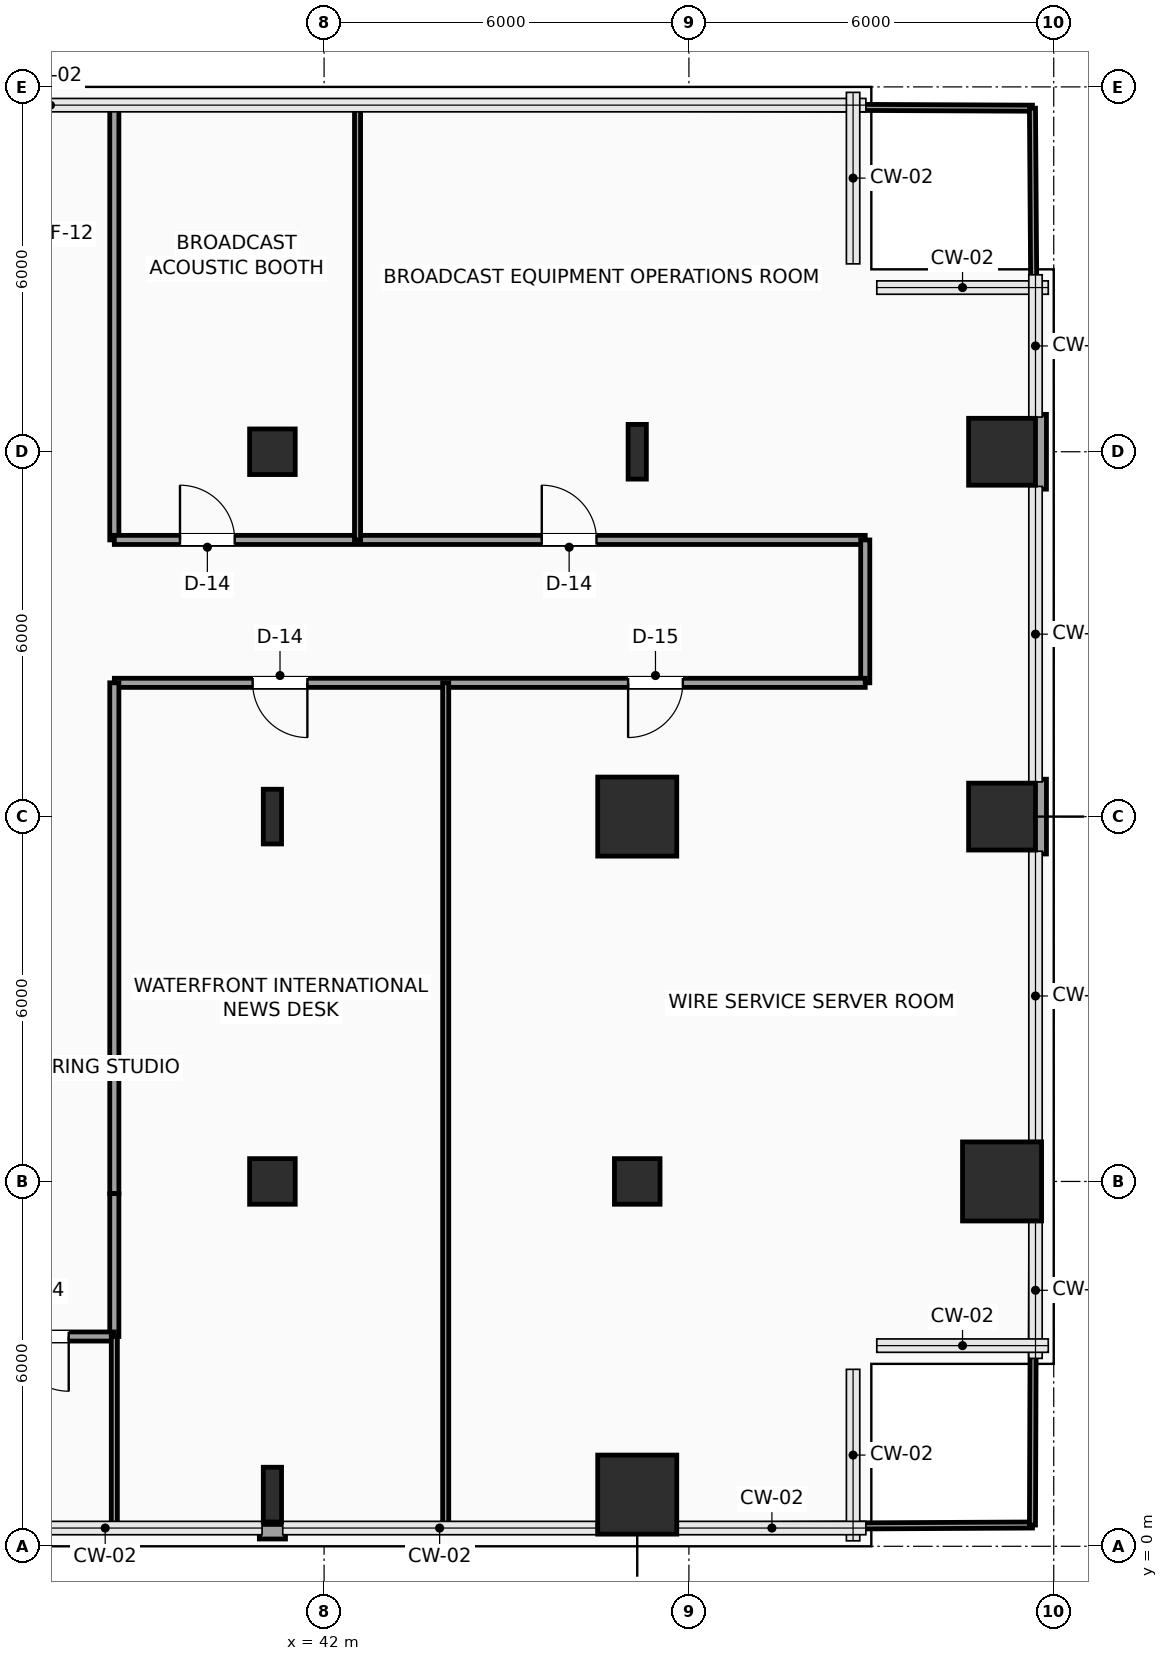
"""IFC4 building model, lengths in metres.
Left out: names, types, materials, properties, quantities, classifications, styles, units other than length and angle.
Written with IfcOpenShell. Run it as: python <this file> out.ifc"""

import sys

from ifc_helpers import new_model, si_unit, direction, frame, frame_2d, origin, origin_2d, place, context, subcontext, project, spatial, rectangle, hollow_rectangle, i_section, extrude, element, fill, save


model = new_model("IFC4")
c1 = context("Model", 3, precision=1e-05, world=origin(), true_north=direction((0.0, 1.0)))
c2 = subcontext(c1, "Body", "Model", "MODEL_VIEW")
j1 = project(units=[si_unit("LENGTHUNIT", "METRE"), si_unit("PLANEANGLEUNIT", "RADIAN")], contexts=[c1])
p1 = place(None, origin())
s1 = spatial("IfcSite", under=j1, at=p1, CompositionType="ELEMENT")
p2 = place(p1, origin())
s2 = spatial("IfcBuilding", under=s1, at=p2, CompositionType="ELEMENT")
p3 = place(p2, frame((0.0, 0.0, 36.3)))
s3 = spatial("IfcBuildingStorey", under=s2, at=p3, CompositionType="ELEMENT", Elevation=36.3)
p4 = place(p3, frame((41.15, 0.85, 0.0), z_axis=(0.0, 0.0, 1.0), x_axis=(1.0, 0.0, 0.0)))
e1 = element("IfcColumn", 1, at=p4, inside=s3, PredefinedType="COLUMN", context=c2, shape_type="SweptSolid", body=[
    extrude(i_section(OverallWidth=0.3, OverallDepth=0.9, WebThickness=0.019, FlangeThickness=0.035, FilletRadius=0.03, at=origin_2d()), origin(), (0.0, 0.0, 1.0), 3.9),
])
p5 = place(p3, frame((41.15, 6.0, 0.0), z_axis=(0.0, 0.0, 1.0), x_axis=(1.0, 0.0, 0.0)))
e2 = element("IfcColumn", 2, at=p5, inside=s3, PredefinedType="COLUMN", context=c2, shape_type="SweptSolid", body=[
    extrude(hollow_rectangle(XDim=0.75, YDim=0.75, WallThickness=0.035, InnerFilletRadius=0.035, OuterFilletRadius=0.05, at=origin_2d()), origin(), (0.0, 0.0, 1.0), 3.9),
])
p6 = place(p3, frame((41.15, 12.0, 0.0), z_axis=(0.0, 0.0, 1.0), x_axis=(1.0, 0.0, 0.0)))
e3 = element("IfcColumn", 3, at=p6, inside=s3, PredefinedType="COLUMN", context=c2, shape_type="SweptSolid", body=[
    extrude(i_section(OverallWidth=0.3, OverallDepth=0.9, WebThickness=0.019, FlangeThickness=0.035, FilletRadius=0.03, at=origin_2d()), origin(), (0.0, 0.0, 1.0), 3.9),
])
p7 = place(p3, frame((41.15, 18.0, 0.0), z_axis=(0.0, 0.0, 1.0), x_axis=(1.0, 0.0, 0.0)))
e4 = element("IfcColumn", 4, at=p7, inside=s3, PredefinedType="COLUMN", context=c2, shape_type="SweptSolid", body=[
    extrude(hollow_rectangle(XDim=0.75, YDim=0.75, WallThickness=0.035, InnerFilletRadius=0.035, OuterFilletRadius=0.05, at=origin_2d()), origin(), (0.0, 0.0, 1.0), 3.9),
])
p8 = place(p3, frame((47.15, 0.85, 0.0), z_axis=(0.0, 0.0, 1.0), x_axis=(1.0, 0.0, 0.0)))
e5 = element("IfcColumn", 5, at=p8, inside=s3, PredefinedType="COLUMN", context=c2, shape_type="SweptSolid", body=[
    extrude(rectangle(XDim=1.3, YDim=1.3, at=origin_2d()), origin(), (0.0, 0.0, 1.0), 3.9),
])
p9 = place(p3, frame((47.15, 6.0, 0.0), z_axis=(0.0, 0.0, 1.0), x_axis=(1.0, 0.0, 0.0)))
e6 = element("IfcColumn", 6, at=p9, inside=s3, PredefinedType="COLUMN", context=c2, shape_type="SweptSolid", body=[
    extrude(hollow_rectangle(XDim=0.75, YDim=0.75, WallThickness=0.035, InnerFilletRadius=0.035, OuterFilletRadius=0.05, at=origin_2d()), origin(), (0.0, 0.0, 1.0), 3.9),
])
p10 = place(p3, frame((47.15, 12.0, 0.0), z_axis=(0.0, 0.0, 1.0), x_axis=(1.0, 0.0, 0.0)))
e7 = element("IfcColumn", 7, at=p10, inside=s3, PredefinedType="COLUMN", context=c2, shape_type="SweptSolid", body=[
    extrude(rectangle(XDim=1.3, YDim=1.3, at=origin_2d()), origin(), (0.0, 0.0, 1.0), 3.9),
])
p11 = place(p3, frame((47.15, 18.0, 0.0), z_axis=(0.0, 0.0, 1.0), x_axis=(1.0, 0.0, 0.0)))
e8 = element("IfcColumn", 8, at=p11, inside=s3, PredefinedType="COLUMN", context=c2, shape_type="SweptSolid", body=[
    extrude(i_section(OverallWidth=0.3, OverallDepth=0.9, WebThickness=0.019, FlangeThickness=0.035, FilletRadius=0.03, at=origin_2d()), origin(), (0.0, 0.0, 1.0), 3.9),
])
p12 = place(p3, frame((53.15, 6.0, 0.0), z_axis=(0.0, 0.0, 1.0), x_axis=(1.0, 0.0, 0.0)))
e9 = element("IfcColumn", 9, at=p12, inside=s3, PredefinedType="COLUMN", context=c2, shape_type="SweptSolid", body=[
    extrude(rectangle(XDim=1.3, YDim=1.3, at=origin_2d()), origin(), (0.0, 0.0, 1.0), 3.9),
])
for number, where, z_axis, x_axis in (
    (10, (53.15, 12.0, 0.0), (0.0, 0.0, 1.0), (1.0, 0.0, 0.0)),
    (11, (53.15, 18.0, 0.0), (0.0, 0.0, 1.0), (1.0, 0.0, 0.0)),
):
    element("IfcColumn", number, at=place(p3, frame(where, z_axis=z_axis, x_axis=x_axis)), inside=s3, PredefinedType="COLUMN", context=c2, shape_type="SweptSolid", body=[
        extrude(rectangle(XDim=1.1, YDim=1.1, at=origin_2d()), origin(), (0.0, 0.0, 1.0), 3.9),
    ])
for number, where, z_axis, x_axis in (
    (12, (53.76, 18.615, 0.0), (0.0, 0.0, 1.0), (0.0, -1.0, 0.0)),
    (13, (53.76, 12.615, 0.0), (0.0, 0.0, 1.0), (0.0, -1.0, 0.0)),
):
    element("IfcWall", number, at=place(p3, frame(where, z_axis=z_axis, x_axis=x_axis)), inside=s3, PredefinedType="SOLIDWALL", context=c2, shape_type="SweptSolid", body=[
        extrude(rectangle(XDim=1.23, YDim=0.24, at=frame_2d((0.615, 0.0))), origin(), (0.0, 0.0, 1.0), 3.65),
    ])
p13 = place(p3, frame((41.365, 0.24, 0.0), z_axis=(0.0, 0.0, 1.0), x_axis=(-1.0, 0.0, 0.0)))
e14 = element("IfcWall", 14, at=p13, inside=s3, PredefinedType="SOLIDWALL", context=c2, shape_type="SweptSolid", body=[
    extrude(rectangle(XDim=0.43, YDim=0.24, at=frame_2d((0.215, 0.0))), origin(), (0.0, 0.0, 1.0), 3.65),
])
p14 = place(p3, frame((38.55, 23.7, 0.0), z_axis=(0.0, 0.0, 1.0), x_axis=(0.0, -1.0, 0.0)))
e15 = element("IfcWall", 15, at=p14, inside=s3, PredefinedType="PARTITIONING", context=c2, shape_type="SweptSolid", body=[
    extrude(rectangle(XDim=7.15, YDim=0.15, at=frame_2d((3.575, 0.0))), origin(), (0.0, 0.0, 1.0), 3.65),
])
p15 = place(p3, frame((38.55, 16.55, 0.0), z_axis=(0.0, 0.0, 1.0), x_axis=(1.0, 0.0, 0.0)))
e16 = element("IfcWall", 16, at=p15, inside=s3, PredefinedType="PARTITIONING", context=c2, shape_type="SweptSolid", body=[
    extrude(rectangle(XDim=12.35, YDim=0.15, at=frame_2d((6.175, 0.0))), origin(), (0.0, 0.0, 1.0), 3.65),
])
p16 = place(p15, frame((1.08, 0.0, 0.0)))
e17 = element("IfcOpeningElement", 17, at=p16, cuts=e16, PredefinedType="OPENING", context=c2, shape_type="SweptSolid", body=[
    extrude(rectangle(XDim=0.9, YDim=2.1, at=frame_2d((0.45, 1.05))), frame((0.0, 0.085, 0.0), z_axis=(0.0, -1.0, 0.0), x_axis=(1.0, 0.0, 0.0)), (0.0, 0.0, 1.0), 0.17),
])
p17 = place(p15, frame((7.03, 0.0, 0.0)))
e18 = element("IfcOpeningElement", 18, at=p17, cuts=e16, PredefinedType="OPENING", context=c2, shape_type="SweptSolid", body=[
    extrude(rectangle(XDim=0.9, YDim=2.1, at=frame_2d((0.45, 1.05))), frame((0.0, 0.085, 0.0), z_axis=(0.0, -1.0, 0.0), x_axis=(1.0, 0.0, 0.0)), (0.0, 0.0, 1.0), 0.17),
])
p18 = place(p3, frame((50.9, 16.55, 0.0), z_axis=(0.0, 0.0, 1.0), x_axis=(0.0, -1.0, 0.0)))
e19 = element("IfcWall", 19, at=p18, inside=s3, PredefinedType="PARTITIONING", context=c2, shape_type="SweptSolid", body=[
    extrude(rectangle(XDim=2.35, YDim=0.15, at=frame_2d((1.175, 0.0))), origin(), (0.0, 0.0, 1.0), 3.65),
])
p19 = place(p3, frame((50.9, 14.2, 0.0), z_axis=(0.0, 0.0, 1.0), x_axis=(-1.0, 0.0, 0.0)))
e20 = element("IfcWall", 20, at=p19, inside=s3, PredefinedType="PARTITIONING", context=c2, shape_type="SweptSolid", body=[
    extrude(rectangle(XDim=12.35, YDim=0.15, at=frame_2d((6.175, 0.0))), origin(), (0.0, 0.0, 1.0), 3.65),
])
p20 = place(p19, frame((9.175, 0.0, 0.0)))
e21 = element("IfcOpeningElement", 21, at=p20, cuts=e20, PredefinedType="OPENING", context=c2, shape_type="SweptSolid", body=[
    extrude(rectangle(XDim=0.9, YDim=2.1, at=frame_2d((0.45, 1.05))), frame((0.0, 0.085, 0.0), z_axis=(0.0, -1.0, 0.0), x_axis=(1.0, 0.0, 0.0)), (0.0, 0.0, 1.0), 0.17),
])
p21 = place(p19, frame((3.0, 0.0, 0.0)))
e22 = element("IfcOpeningElement", 22, at=p21, cuts=e20, PredefinedType="OPENING", context=c2, shape_type="SweptSolid", body=[
    extrude(rectangle(XDim=0.9, YDim=2.1, at=frame_2d((0.45, 1.05))), frame((0.0, 0.085, 0.0), z_axis=(0.0, -1.0, 0.0), x_axis=(1.0, 0.0, 0.0)), (0.0, 0.0, 1.0), 0.17),
])
p22 = place(p3, frame((38.55, 14.2, 0.0), z_axis=(0.0, 0.0, 1.0), x_axis=(0.0, -1.0, 0.0)))
e23 = element("IfcWall", 23, at=p22, inside=s3, PredefinedType="PARTITIONING", context=c2, shape_type="SweptSolid", body=[
    extrude(rectangle(XDim=8.4, YDim=0.15, at=frame_2d((4.2, 0.0))), origin(), (0.0, 0.0, 1.0), 3.65),
])
p23 = place(p3, frame((38.55, 5.8, 0.0), z_axis=(0.0, 0.0, 1.0), x_axis=(0.0, -1.0, 0.0)))
e24 = element("IfcWall", 24, at=p23, inside=s3, PredefinedType="PARTITIONING", context=c2, shape_type="SweptSolid", body=[
    extrude(rectangle(XDim=2.35, YDim=0.15, at=frame_2d((1.175, 0.0))), origin(), (0.0, 0.0, 1.0), 3.65),
])
p24 = place(p3, frame((38.55, 3.45, 0.0), z_axis=(0.0, 0.0, 1.0), x_axis=(-1.0, 0.0, 0.0)))
e25 = element("IfcWall", 25, at=p24, inside=s3, PredefinedType="PARTITIONING", context=c2, shape_type="SweptSolid", body=[
    extrude(rectangle(XDim=2.4, YDim=0.15, at=frame_2d((1.2, 0.0))), origin(), (0.0, 0.0, 1.0), 3.142),
])
p25 = place(p24, frame((0.75, 0.0, 0.0)))
e26 = element("IfcOpeningElement", 26, at=p25, cuts=e25, PredefinedType="OPENING", context=c2, shape_type="SweptSolid", body=[
    extrude(rectangle(XDim=0.9, YDim=2.1, at=frame_2d((0.45, 1.05))), frame((0.0, 0.085, 0.0), z_axis=(0.0, -1.0, 0.0), x_axis=(1.0, 0.0, 0.0)), (0.0, 0.0, 1.0), 0.17),
])
p26 = place(p3, frame((44.0, 0.3, 0.0), z_axis=(0.0, 0.0, 1.0), x_axis=(0.0, 1.0, 0.0)))
e27 = element("IfcWall", 27, at=p26, inside=s3, PredefinedType="PARTITIONING", context=c2, shape_type="SweptSolid", body=[
    extrude(rectangle(XDim=13.9, YDim=0.1, at=frame_2d((6.95, 0.0))), origin(), (0.0, 0.0, 1.0), 3.65),
])
p27 = place(p3, frame((44.0, 0.3, 0.0), z_axis=(0.0, 0.0, 1.0), x_axis=(0.99998655059, 0.005186389791, 0.0)))
e28 = element("IfcWall", 28, at=p27, inside=s3, PredefinedType="PARTITIONING", context=c2, shape_type="SweptSolid", body=[
    extrude(rectangle(XDim=9.65, YDim=0.1, at=frame_2d((4.825, 0.0))), origin(), (0.0, 0.0, 1.0), 3.65),
])
p28 = place(p3, frame((53.65, 0.35, 0.0), z_axis=(0.0, 0.0, 1.0), x_axis=(0.003606251025, 0.999993497456, 0.0)))
e29 = element("IfcWall", 29, at=p28, inside=s3, PredefinedType="PARTITIONING", context=c2, shape_type="SweptSolid", body=[
    extrude(rectangle(XDim=11.035, YDim=0.1, at=frame_2d((5.518, 0.0))), origin(), (0.0, 0.0, 1.0), 3.65),
])
p29 = place(p3, frame((53.694, 12.615, 0.0), z_axis=(0.0, 0.0, 1.0), x_axis=(0.003542799701, 0.999993724265, 0.0)))
e30 = element("IfcWall", 30, at=p29, inside=s3, PredefinedType="PARTITIONING", context=c2, shape_type="SweptSolid", body=[
    extrude(rectangle(XDim=1.585, YDim=0.1, at=frame_2d((0.792, 0.0))), origin(), (0.0, 0.0, 1.0), 3.65),
])
p30 = place(p3, frame((42.55, 16.55, 0.0), z_axis=(0.0, 0.0, 1.0), x_axis=(0.0, 1.0, 0.0)))
e31 = element("IfcWall", 31, at=p30, inside=s3, PredefinedType="PARTITIONING", context=c2, shape_type="SweptSolid", body=[
    extrude(rectangle(XDim=7.15, YDim=0.1, at=frame_2d((3.575, 0.0))), origin(), (0.0, 0.0, 1.0), 3.65),
])
p31 = place(p3, frame((42.55, 23.7, 0.0), z_axis=(0.0, 0.0, 1.0), x_axis=(0.999989834782, -0.004508917104, 0.0)))
e32 = element("IfcWall", 32, at=p31, inside=s3, PredefinedType="PARTITIONING", context=c2, shape_type="SweptSolid", body=[
    extrude(rectangle(XDim=11.1, YDim=0.1, at=frame_2d((5.55, 0.0))), origin(), (0.0, 0.0, 1.0), 3.65),
])
p32 = place(p3, frame((53.7, 16.55, 0.0), z_axis=(0.0, 0.0, 1.0), x_axis=(-0.007017371073, 0.999975377948, 0.0)))
e33 = element("IfcWall", 33, at=p32, inside=s3, PredefinedType="PARTITIONING", context=c2, shape_type="SweptSolid", body=[
    extrude(rectangle(XDim=0.835, YDim=0.1, at=frame_2d((0.417, 0.0))), origin(), (0.0, 0.0, 1.0), 3.65),
])
p33 = place(p3, frame((53.686, 18.615, 0.0), z_axis=(0.0, 0.0, 1.0), x_axis=(-0.007079296972, 0.999974941463, 0.0)))
e34 = element("IfcWall", 34, at=p33, inside=s3, PredefinedType="PARTITIONING", context=c2, shape_type="SweptSolid", body=[
    extrude(rectangle(XDim=5.035, YDim=0.1, at=frame_2d((2.518, 0.0))), origin(), (0.0, 0.0, 1.0), 3.65),
])
p34 = place(p3, frame((38.55, 0.3, 0.0), z_axis=(0.0, 0.0, 1.0), x_axis=(0.0, 1.0, 0.0)))
e35 = element("IfcWall", 35, at=p34, inside=s3, PredefinedType="PARTITIONING", context=c2, shape_type="SweptSolid", body=[
    extrude(rectangle(XDim=3.15, YDim=0.1, at=frame_2d((1.575, 0.0))), origin(), (0.0, 0.0, 1.0), 3.65),
])
p35 = place(p16, origin())
e36 = element("IfcDoor", 36, at=p35, inside=s3, OperationType="SINGLE_SWING_LEFT", PredefinedType="DOOR", context=c2, shape_type="SweptSolid", body=[
    extrude(rectangle(XDim=0.9, YDim=2.1, at=frame_2d((0.45, 1.05))), frame((0.0, 0.025, 0.0), z_axis=(0.0, -1.0, 0.0), x_axis=(1.0, 0.0, 0.0)), (0.0, 0.0, 1.0), 0.05),
])
fill(e17, e36)
p36 = place(p17, origin())
e37 = element("IfcDoor", 37, at=p36, inside=s3, OperationType="SINGLE_SWING_LEFT", PredefinedType="DOOR", context=c2, shape_type="SweptSolid", body=[
    extrude(rectangle(XDim=0.9, YDim=2.1, at=frame_2d((0.45, 1.05))), frame((0.0, 0.025, 0.0), z_axis=(0.0, -1.0, 0.0), x_axis=(1.0, 0.0, 0.0)), (0.0, 0.0, 1.0), 0.05),
])
fill(e18, e37)
p37 = place(p20, origin())
e38 = element("IfcDoor", 38, at=p37, inside=s3, OperationType="SINGLE_SWING_LEFT", PredefinedType="DOOR", context=c2, shape_type="SweptSolid", body=[
    extrude(rectangle(XDim=0.9, YDim=2.1, at=frame_2d((0.45, 1.05))), frame((0.0, 0.025, 0.0), z_axis=(0.0, -1.0, 0.0), x_axis=(1.0, 0.0, 0.0)), (0.0, 0.0, 1.0), 0.05),
])
fill(e21, e38)
p38 = place(p21, origin())
e39 = element("IfcDoor", 39, at=p38, inside=s3, OperationType="SINGLE_SWING_RIGHT", PredefinedType="DOOR", context=c2, shape_type="SweptSolid", body=[
    extrude(rectangle(XDim=0.9, YDim=2.1, at=frame_2d((0.45, 1.05))), frame((0.0, 0.025, 0.0), z_axis=(0.0, -1.0, 0.0), x_axis=(1.0, 0.0, 0.0)), (0.0, 0.0, 1.0), 0.05),
])
fill(e22, e39)
p39 = place(p25, origin())
e40 = element("IfcDoor", 40, at=p39, inside=s3, OperationType="SINGLE_SWING_LEFT", PredefinedType="DOOR", context=c2, shape_type="SweptSolid", body=[
    extrude(rectangle(XDim=0.9, YDim=2.1, at=frame_2d((0.45, 1.05))), frame((0.0, 0.025, 0.0), z_axis=(0.0, -1.0, 0.0), x_axis=(1.0, 0.0, 0.0)), (0.0, 0.0, 1.0), 0.05),
])
fill(e26, e40)
save(model, sys.argv[1])
